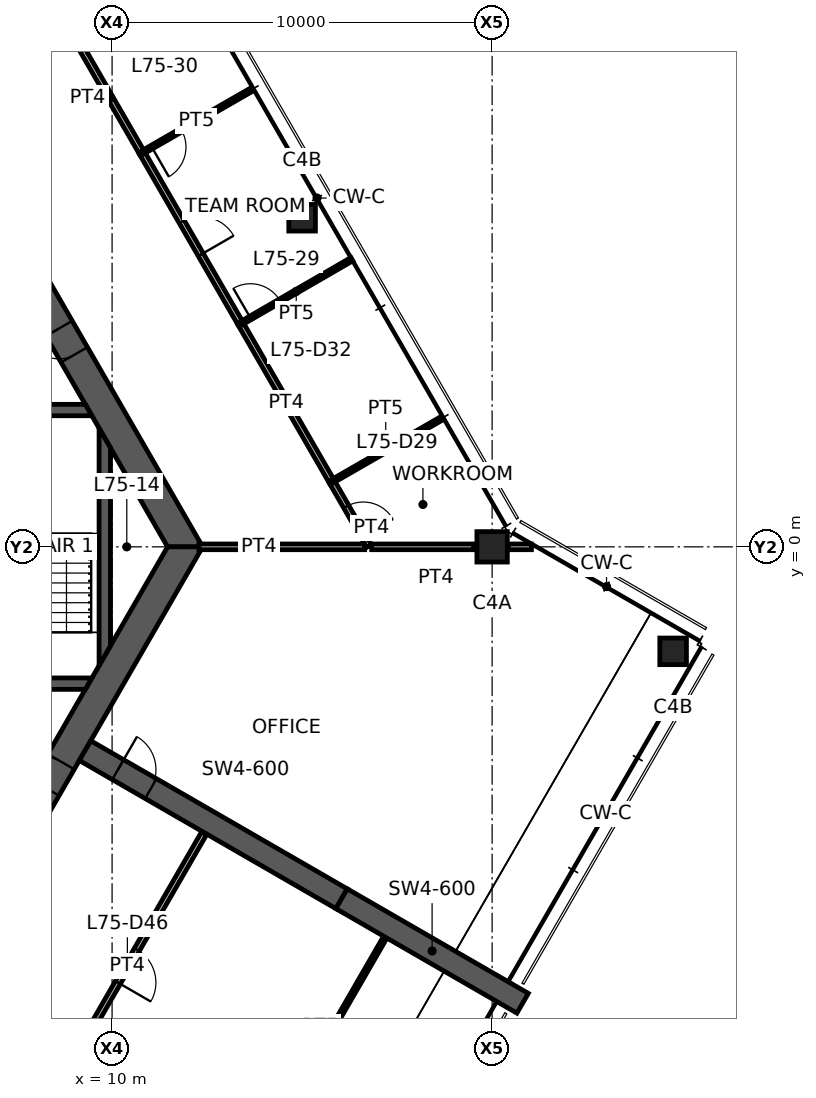
"""IFC4 building model, lengths in metres.
Left out: names, types, materials, properties, quantities, classifications, styles, units other than length and angle.
Written with IfcOpenShell. Run it as: python <this file> out.ifc"""

import sys

from ifc_helpers import new_model, si_unit, direction, frame, frame_2d, origin, origin_2d, place, context, subcontext, project, spatial, polyline, rectangle, hollow_rectangle, outline, extrude, element, fill, save


model = new_model("IFC4")
c1 = context("Model", 3, precision=1e-05, world=origin(), true_north=direction((0.0, 1.0)))
c2 = subcontext(c1, "Body", "Model", "MODEL_VIEW")
j1 = project(units=[si_unit("LENGTHUNIT", "METRE"), si_unit("PLANEANGLEUNIT", "RADIAN")], contexts=[c1])
p1 = place(None, origin())
s1 = spatial("IfcSite", under=j1, at=p1, CompositionType="ELEMENT")
p2 = place(p1, origin())
s2 = spatial("IfcBuilding", under=s1, at=p2, CompositionType="ELEMENT")
p3 = place(p2, frame((0.0, 0.0, 298.6)))
s3 = spatial("IfcBuildingStorey", under=s2, at=p3, CompositionType="ELEMENT", Elevation=298.6)
p4 = place(p3, frame((20.0, 0.0, 0.0), z_axis=(0.0, 0.0, 1.0), x_axis=(1.0, 0.0, 0.0)))
e1 = element("IfcColumn", 1, at=p4, inside=s3, PredefinedType="COLUMN", context=c2, shape_type="SweptSolid", body=[
    extrude(hollow_rectangle(XDim=0.8, YDim=0.8, WallThickness=0.04, at=origin_2d()), origin(), (0.0, 0.0, 1.0), 3.9),
])
for number, where, z_axis, x_axis in (
    (2, (15.0, 8.66, 0.0), (0.0, 0.0, 1.0), (1.0, 0.0, 0.0)),
    (3, (24.763, -2.75, 0.0), (0.0, 0.0, 1.0), (1.0, 0.0, 0.0)),
):
    element("IfcColumn", number, at=place(p3, frame(where, z_axis=z_axis, x_axis=x_axis)), inside=s3, PredefinedType="COLUMN", context=c2, shape_type="SweptSolid", body=[
        extrude(hollow_rectangle(XDim=0.7, YDim=0.7, WallThickness=0.032, at=origin_2d()), origin(), (0.0, 0.0, 1.0), 3.9),
    ])
p5 = place(p3, frame((11.922, 0.0, 0.0), z_axis=(0.0, 0.0, 1.0), x_axis=(-0.500004296715, 0.866022923061, 0.0)))
e4 = element("IfcWall", 4, at=p5, inside=s3, PredefinedType="SHEAR", context=c2, shape_type="SweptSolid", body=[
    extrude(outline(polyline([(-0.231, -0.4), (5.835, -0.4), (6.635, -0.4), (12.153, -0.4), (11.691, 0.4), (6.635, 0.4), (5.835, 0.4), (0.231, 0.4), (-0.231, -0.4)])), origin(), (0.0, 0.0, 1.0), 3.9),
])
p6 = place(p5, frame((5.835, 0.0, 0.0)))
e5 = element("IfcOpeningElement", 5, at=p6, cuts=e4, PredefinedType="OPENING", context=c2, shape_type="SweptSolid", body=[
    extrude(rectangle(XDim=0.8, YDim=2.1, at=frame_2d((0.4, 1.05))), frame((0.0, 0.41, 0.0), z_axis=(0.0, -1.0, 0.0), x_axis=(1.0, 0.0, 0.0)), (0.0, 0.0, 1.0), 0.82),
])
p7 = place(p3, frame((5.961, -10.325, 0.0), z_axis=(0.0, 0.0, 1.0), x_axis=(0.500004296715, 0.866022923061, 0.0)))
e6 = element("IfcWall", 6, at=p7, inside=s3, PredefinedType="SHEAR", context=c2, shape_type="SweptSolid", body=[
    extrude(outline(polyline([(-0.231, -0.4), (4.594, -0.4), (5.394, -0.4), (12.153, -0.4), (11.691, 0.4), (5.394, 0.4), (4.594, 0.4), (0.231, 0.4), (-0.231, -0.4)])), origin(), (0.0, 0.0, 1.0), 3.9),
])
p8 = place(p7, frame((4.594, 0.0, 0.0)))
e7 = element("IfcOpeningElement", 7, at=p8, cuts=e6, PredefinedType="OPENING", context=c2, shape_type="SweptSolid", body=[
    extrude(rectangle(XDim=0.8, YDim=2.1, at=frame_2d((0.4, 1.05))), frame((0.0, 0.41, 0.0), z_axis=(0.0, -1.0, 0.0), x_axis=(1.0, 0.0, 0.0)), (0.0, 0.0, 1.0), 0.82),
])
p9 = place(p3, frame((9.288, -5.363, 0.0), z_axis=(0.0, 0.0, 1.0), x_axis=(0.866031736626, -0.499989031036, 0.0)))
e8 = element("IfcWall", 8, at=p9, inside=s3, PredefinedType="SHEAR", context=c2, shape_type="SweptSolid", body=[
    extrude(rectangle(XDim=7.796, YDim=0.6, at=frame_2d((3.898, 0.0))), origin(), (0.0, 0.0, 1.0), 3.9),
])
p10 = place(p9, frame((1.0, 0.0, 0.0)))
e9 = element("IfcOpeningElement", 9, at=p10, cuts=e8, PredefinedType="OPENING", context=c2, shape_type="SweptSolid", body=[
    extrude(rectangle(XDim=1.0, YDim=2.1, at=frame_2d((0.5, 1.05))), frame((0.0, 0.31, 0.0), z_axis=(0.0, -1.0, 0.0), x_axis=(1.0, 0.0, 0.0)), (0.0, 0.0, 1.0), 0.62),
])
p11 = place(p3, frame((16.039, -9.26, 0.0), z_axis=(0.0, 0.0, 1.0), x_axis=(0.866027397988, -0.499996545922, 0.0)))
e10 = element("IfcWall", 10, at=p11, inside=s3, PredefinedType="SHEAR", context=c2, shape_type="SweptSolid", body=[
    extrude(rectangle(XDim=5.5, YDim=0.6, at=frame_2d((2.75, 0.0))), origin(), (0.0, 0.0, 1.0), 3.9),
])
p12 = place(p3, frame((1.45, 3.6, 0.0), z_axis=(0.0, 0.0, 1.0), x_axis=(1.0, 0.0, 0.0)))
e11 = element("IfcWall", 11, at=p12, inside=s3, PredefinedType="SHEAR", context=c2, shape_type="SweptSolid", body=[
    extrude(outline(polyline([(0.0, -0.15), (1.15, -0.15), (2.05, -0.15), (3.4, -0.15), (4.7, -0.15), (8.019, -0.15), (7.845, 0.15), (4.7, 0.15), (3.4, 0.15), (2.05, 0.15), (1.15, 0.15), (0.0, 0.15), (0.0, -0.15)])), origin(), (0.0, 0.0, 1.0), 3.9),
])
p13 = place(p12, frame((1.15, 0.0, 0.0)))
e12 = element("IfcOpeningElement", 12, at=p13, cuts=e11, PredefinedType="OPENING", context=c2, shape_type="SweptSolid", body=[
    extrude(rectangle(XDim=0.9, YDim=2.1, at=frame_2d((0.45, 1.05))), frame((0.0, 0.16, 0.0), z_axis=(0.0, -1.0, 0.0), x_axis=(1.0, 0.0, 0.0)), (0.0, 0.0, 1.0), 0.32),
])
p14 = place(p12, frame((3.4, 0.0, 0.0)))
e13 = element("IfcOpeningElement", 13, at=p14, cuts=e11, PredefinedType="OPENING", context=c2, shape_type="SweptSolid", body=[
    extrude(rectangle(XDim=1.3, YDim=2.1, at=frame_2d((0.65, 1.05))), frame((0.0, 0.16, 0.0), z_axis=(0.0, -1.0, 0.0), x_axis=(1.0, 0.0, 0.0)), (0.0, 0.0, 1.0), 0.32),
])
p15 = place(p3, frame((1.45, -3.6, 0.0), z_axis=(0.0, 0.0, 1.0), x_axis=(1.0, 0.0, 0.0)))
e14 = element("IfcWall", 14, at=p15, inside=s3, PredefinedType="SHEAR", context=c2, shape_type="SweptSolid", body=[
    extrude(outline(polyline([(0.0, -0.15), (1.05, -0.15), (2.15, -0.15), (7.845, -0.15), (8.019, 0.15), (2.15, 0.15), (1.05, 0.15), (0.0, 0.15), (0.0, -0.15)])), origin(), (0.0, 0.0, 1.0), 3.9),
])
p16 = place(p15, frame((1.05, 0.0, 0.0)))
e15 = element("IfcOpeningElement", 15, at=p16, cuts=e14, PredefinedType="OPENING", context=c2, shape_type="SweptSolid", body=[
    extrude(rectangle(XDim=1.1, YDim=2.1, at=frame_2d((0.55, 1.05))), frame((0.0, 0.16, 0.0), z_axis=(0.0, -1.0, 0.0), x_axis=(1.0, 0.0, 0.0)), (0.0, 0.0, 1.0), 0.32),
])
p17 = place(p3, frame((9.808, -2.862, 0.0), z_axis=(0.0, 0.0, 1.0), x_axis=(0.0, 1.0, 0.0)))
e16 = element("IfcWall", 16, at=p17, inside=s3, PredefinedType="SHEAR", context=c2, shape_type="SweptSolid", body=[
    extrude(outline(polyline([(0.26, -0.15), (5.465, -0.15), (5.984, 0.15), (-0.26, 0.15), (0.26, -0.15)])), origin(), (0.0, 0.0, 1.0), 3.9),
])
p18 = place(p3, frame((13.376, 5.882, 0.0), z_axis=(0.0, 0.0, 1.0), x_axis=(0.499991431567, -0.866030350715, 0.0)))
e17 = element("IfcWall", 17, at=p18, inside=s3, PredefinedType="PARTITIONING", context=c2, shape_type="SweptSolid", body=[
    extrude(rectangle(XDim=4.819, YDim=0.15, at=frame_2d((2.409, 0.0))), origin(), (0.0, 0.0, 1.0), 2.35),
])
p19 = place(p3, frame((9.119, 13.256, 0.0), z_axis=(0.0, 0.0, 1.0), x_axis=(0.499990242038, -0.866031037473, 0.0)))
e18 = element("IfcWall", 18, at=p19, inside=s3, PredefinedType="PARTITIONING", context=c2, shape_type="SweptSolid", body=[
    extrude(rectangle(XDim=3.341, YDim=0.15, at=frame_2d((1.67, 0.0))), origin(), (0.0, 0.0, 1.0), 2.35),
])
p20 = place(p3, frame((15.781, 1.717, 0.0), z_axis=(0.0, 0.0, 1.0), x_axis=(0.499984888139, -0.866034128446, 0.0)))
e19 = element("IfcWall", 19, at=p20, inside=s3, PredefinedType="PARTITIONING", context=c2, shape_type="SweptSolid", body=[
    extrude(rectangle(XDim=1.959, YDim=0.15, at=frame_2d((0.98, 0.0))), origin(), (0.0, 0.0, 1.0), 2.35),
])
p21 = place(p20, frame((0.76, 0.0, 0.0)))
e20 = element("IfcOpeningElement", 20, at=p21, cuts=e19, PredefinedType="OPENING", context=c2, shape_type="SweptSolid", body=[
    extrude(rectangle(XDim=0.9, YDim=2.1, at=frame_2d((0.45, 1.05))), frame((0.0, 0.085, 0.0), z_axis=(0.0, -1.0, 0.0), x_axis=(1.0, 0.0, 0.0)), (0.0, 0.0, 1.0), 0.17),
])
p22 = place(p3, frame((10.785, 10.37, 0.0), z_axis=(0.0, 0.0, 1.0), x_axis=(0.499992432099, -0.86602977307, 0.0)))
e21 = element("IfcWall", 21, at=p22, inside=s3, PredefinedType="PARTITIONING", context=c2, shape_type="SweptSolid", body=[
    extrude(rectangle(XDim=5.192, YDim=0.15, at=frame_2d((2.596, 0.0))), origin(), (0.0, 0.0, 1.0), 2.35),
])
p23 = place(p22, frame((2.096, 0.0, 0.0)))
e22 = element("IfcOpeningElement", 22, at=p23, cuts=e21, PredefinedType="OPENING", context=c2, shape_type="SweptSolid", body=[
    extrude(rectangle(XDim=1.0, YDim=2.1, at=frame_2d((0.5, 1.05))), frame((0.0, 0.085, 0.0), z_axis=(0.0, -1.0, 0.0), x_axis=(1.0, 0.0, 0.0)), (0.0, 0.0, 1.0), 0.17),
])
p24 = place(p3, frame((18.62, 3.351, 0.0), z_axis=(0.0, 0.0, 1.0), x_axis=(-0.866762109236, -0.498721812229, 0.0)))
e23 = element("IfcWall", 23, at=p24, inside=s3, PredefinedType="PARTITIONING", context=c2, shape_type="SweptSolid", body=[
    extrude(rectangle(XDim=3.275, YDim=0.1, at=frame_2d((1.637, 0.0))), origin(), (0.0, 0.0, 1.0), 2.35),
])
p25 = place(p3, frame((13.381, 5.874, 0.0), z_axis=(0.0, 0.0, 1.0), x_axis=(0.865294595383, 0.501263666348, 0.0)))
e24 = element("IfcWall", 24, at=p25, inside=s3, PredefinedType="PARTITIONING", context=c2, shape_type="SweptSolid", body=[
    extrude(rectangle(XDim=3.385, YDim=0.1, at=frame_2d((1.693, 0.0))), origin(), (0.0, 0.0, 1.0), 2.35),
])
p26 = place(p25, frame((0.3, 0.0, 0.0)))
e25 = element("IfcOpeningElement", 25, at=p26, cuts=e24, PredefinedType="OPENING", context=c2, shape_type="SweptSolid", body=[
    extrude(rectangle(XDim=0.9, YDim=2.1, at=frame_2d((0.45, 1.05))), frame((0.0, 0.06, 0.0), z_axis=(0.0, -1.0, 0.0), x_axis=(1.0, 0.0, 0.0)), (0.0, 0.0, 1.0), 0.12),
])
p27 = place(p3, frame((13.654, 12.022, 0.0), z_axis=(0.0, 0.0, 1.0), x_axis=(-0.866613759554, -0.498979550434, 0.0)))
e26 = element("IfcWall", 26, at=p27, inside=s3, PredefinedType="PARTITIONING", context=c2, shape_type="SweptSolid", body=[
    extrude(rectangle(XDim=3.311, YDim=0.1, at=frame_2d((1.655, 0.0))), origin(), (0.0, 0.0, 1.0), 2.35),
])
p28 = place(p27, frame((2.11, 0.0, 0.0)))
e27 = element("IfcOpeningElement", 27, at=p28, cuts=e26, PredefinedType="OPENING", context=c2, shape_type="SweptSolid", body=[
    extrude(rectangle(XDim=0.9, YDim=2.1, at=frame_2d((0.45, 1.05))), frame((0.0, 0.06, 0.0), z_axis=(0.0, -1.0, 0.0), x_axis=(1.0, 0.0, 0.0)), (0.0, 0.0, 1.0), 0.12),
])
p29 = place(p3, frame((12.419, -7.54, 0.0), z_axis=(0.0, 0.0, 1.0), x_axis=(-0.499996687877, -0.866027316031, 0.0)))
e28 = element("IfcWall", 28, at=p29, inside=s3, PredefinedType="PARTITIONING", context=c2, shape_type="SweptSolid", body=[
    extrude(rectangle(XDim=8.066, YDim=0.15, at=frame_2d((4.033, 0.0))), origin(), (0.0, 0.0, 1.0), 2.35),
])
p30 = place(p29, frame((3.533, 0.0, 0.0)))
e29 = element("IfcOpeningElement", 29, at=p30, cuts=e28, PredefinedType="OPENING", context=c2, shape_type="SweptSolid", body=[
    extrude(rectangle(XDim=1.0, YDim=2.1, at=frame_2d((0.5, 1.05))), frame((0.0, 0.085, 0.0), z_axis=(0.0, -1.0, 0.0), x_axis=(1.0, 0.0, 0.0)), (0.0, 0.0, 1.0), 0.17),
])
p31 = place(p3, frame((13.788, -16.159, 0.0), z_axis=(0.0, 0.0, 1.0), x_axis=(0.499992600721, 0.866029675718, 0.0)))
e30 = element("IfcWall", 30, at=p31, inside=s3, PredefinedType="PARTITIONING", context=c2, shape_type="SweptSolid", body=[
    extrude(rectangle(XDim=6.78, YDim=0.1, at=frame_2d((3.39, 0.0))), origin(), (0.0, 0.0, 1.0), 2.35),
])
p32 = place(p31, frame((0.3, 0.0, 0.0)))
e31 = element("IfcOpeningElement", 31, at=p32, cuts=e30, PredefinedType="OPENING", context=c2, shape_type="SweptSolid", body=[
    extrude(rectangle(XDim=0.9, YDim=2.1, at=frame_2d((0.45, 1.05))), frame((0.0, 0.06, 0.0), z_axis=(0.0, -1.0, 0.0), x_axis=(1.0, 0.0, 0.0)), (0.0, 0.0, 1.0), 0.12),
])
p33 = place(p3, frame((19.519, 0.0, 0.0), z_axis=(0.0, 0.0, 1.0), x_axis=(-1.0, 0.0, 0.0)))
e32 = element("IfcWall", 32, at=p33, inside=s3, PredefinedType="PARTITIONING", context=c2, shape_type="SweptSolid", body=[
    extrude(rectangle(XDim=2.688, YDim=0.15, at=frame_2d((1.344, 0.0))), origin(), (0.0, 0.0, 1.0), 2.35),
])
p34 = place(p3, frame((12.284, 0.0, 0.0), z_axis=(0.0, 0.0, 1.0), x_axis=(1.0, 0.0, 0.0)))
e33 = element("IfcWall", 33, at=p34, inside=s3, PredefinedType="PARTITIONING", context=c2, shape_type="SweptSolid", body=[
    extrude(rectangle(XDim=4.363, YDim=0.15, at=frame_2d((2.181, 0.0))), origin(), (0.0, 0.0, 1.0), 2.35),
])
p35 = place(p3, frame((20.42, 0.0, 0.0), z_axis=(0.0, 0.0, 1.0), x_axis=(1.0, 0.0, 0.0)))
e34 = element("IfcWall", 34, at=p35, inside=s3, PredefinedType="PARTITIONING", context=c2, shape_type="SweptSolid", body=[
    extrude(rectangle(XDim=0.614, YDim=0.15, at=frame_2d((0.307, 0.0))), origin(), (0.0, 0.0, 1.0), 2.35),
])
p36 = place(p6, origin())
e35 = element("IfcDoor", 35, at=p36, inside=s3, OperationType="SINGLE_SWING_RIGHT", PredefinedType="DOOR", context=c2, shape_type="SweptSolid", body=[
    extrude(rectangle(XDim=0.8, YDim=2.1, at=frame_2d((0.4, 1.05))), frame((0.0, 0.025, 0.0), z_axis=(0.0, -1.0, 0.0), x_axis=(1.0, 0.0, 0.0)), (0.0, 0.0, 1.0), 0.05),
])
fill(e5, e35)
p37 = place(p8, origin())
e36 = element("IfcDoor", 36, at=p37, inside=s3, OperationType="SINGLE_SWING_LEFT", PredefinedType="DOOR", context=c2, shape_type="SweptSolid", body=[
    extrude(rectangle(XDim=0.8, YDim=2.1, at=frame_2d((0.4, 1.05))), frame((0.0, 0.025, 0.0), z_axis=(0.0, -1.0, 0.0), x_axis=(1.0, 0.0, 0.0)), (0.0, 0.0, 1.0), 0.05),
])
fill(e7, e36)
p38 = place(p10, origin())
e37 = element("IfcDoor", 37, at=p38, inside=s3, OperationType="SINGLE_SWING_LEFT", PredefinedType="DOOR", context=c2, shape_type="SweptSolid", body=[
    extrude(rectangle(XDim=1.0, YDim=2.1, at=frame_2d((0.5, 1.05))), frame((0.0, 0.025, 0.0), z_axis=(0.0, -1.0, 0.0), x_axis=(1.0, 0.0, 0.0)), (0.0, 0.0, 1.0), 0.05),
])
fill(e9, e37)
p39 = place(p21, origin())
e38 = element("IfcDoor", 38, at=p39, inside=s3, OperationType="SINGLE_SWING_RIGHT", PredefinedType="DOOR", context=c2, shape_type="SweptSolid", body=[
    extrude(rectangle(XDim=0.9, YDim=2.1, at=frame_2d((0.45, 1.05))), frame((0.0, 0.025, 0.0), z_axis=(0.0, -1.0, 0.0), x_axis=(1.0, 0.0, 0.0)), (0.0, 0.0, 1.0), 0.05),
])
fill(e20, e38)
p40 = place(p23, origin())
e39 = element("IfcDoor", 39, at=p40, inside=s3, OperationType="SINGLE_SWING_RIGHT", PredefinedType="DOOR", context=c2, shape_type="SweptSolid", body=[
    extrude(rectangle(XDim=1.0, YDim=2.1, at=frame_2d((0.5, 1.05))), frame((0.0, 0.025, 0.0), z_axis=(0.0, -1.0, 0.0), x_axis=(1.0, 0.0, 0.0)), (0.0, 0.0, 1.0), 0.05),
])
fill(e22, e39)
p41 = place(p26, origin())
e40 = element("IfcDoor", 40, at=p41, inside=s3, OperationType="SINGLE_SWING_LEFT", PredefinedType="DOOR", context=c2, shape_type="SweptSolid", body=[
    extrude(rectangle(XDim=0.9, YDim=2.1, at=frame_2d((0.45, 1.05))), frame((0.0, 0.025, 0.0), z_axis=(0.0, -1.0, 0.0), x_axis=(1.0, 0.0, 0.0)), (0.0, 0.0, 1.0), 0.05),
])
fill(e25, e40)
p42 = place(p28, origin())
e41 = element("IfcDoor", 41, at=p42, inside=s3, OperationType="SINGLE_SWING_RIGHT", PredefinedType="DOOR", context=c2, shape_type="SweptSolid", body=[
    extrude(rectangle(XDim=0.9, YDim=2.1, at=frame_2d((0.45, 1.05))), frame((0.0, 0.025, 0.0), z_axis=(0.0, -1.0, 0.0), x_axis=(1.0, 0.0, 0.0)), (0.0, 0.0, 1.0), 0.05),
])
fill(e27, e41)
p43 = place(p30, origin())
e42 = element("IfcDoor", 42, at=p43, inside=s3, OperationType="SINGLE_SWING_RIGHT", PredefinedType="DOOR", context=c2, shape_type="SweptSolid", body=[
    extrude(rectangle(XDim=1.0, YDim=2.1, at=frame_2d((0.5, 1.05))), frame((0.0, 0.025, 0.0), z_axis=(0.0, -1.0, 0.0), x_axis=(1.0, 0.0, 0.0)), (0.0, 0.0, 1.0), 0.05),
])
fill(e29, e42)
save(model, sys.argv[1])
